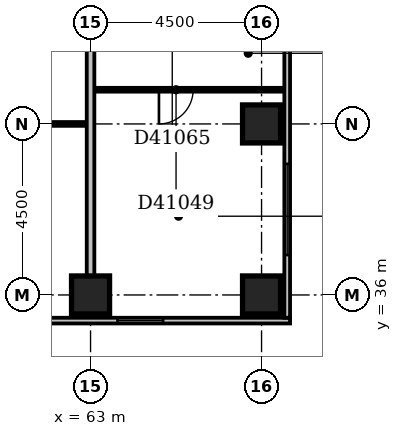
"""IFC4 building model, lengths in metres.
Left out: names, types, materials, properties, quantities, classifications, styles, units other than length and angle.
Written with IfcOpenShell. Run it as: python <this file> out.ifc"""

import sys

from ifc_helpers import new_model, si_unit, direction, frame, frame_2d, origin, origin_2d, place, context, subcontext, project, spatial, rectangle, extrude, element, fill, save


model = new_model("IFC4")
c1 = context("Model", 3, precision=1e-05, world=origin(), true_north=direction((0.0, 1.0)))
c2 = subcontext(c1, "Body", "Model", "MODEL_VIEW")
j1 = project(units=[si_unit("LENGTHUNIT", "METRE"), si_unit("PLANEANGLEUNIT", "RADIAN")], contexts=[c1])
p1 = place(None, origin())
s1 = spatial("IfcSite", under=j1, at=p1, CompositionType="ELEMENT")
p2 = place(p1, origin())
s2 = spatial("IfcBuilding", under=s1, at=p2, CompositionType="ELEMENT")
p3 = place(p2, frame((0.0, 0.0, 162.8)))
s3 = spatial("IfcBuildingStorey", under=s2, at=p3, CompositionType="ELEMENT", Elevation=162.8)
for number, where, z_axis, x_axis in (
    (1, (63.0, 36.0, -0.3), (0.0, 0.0, 1.0), (1.0, 0.0, 0.0)),
    (2, (67.5, 36.0, -0.3), (0.0, 0.0, 1.0), (1.0, 0.0, 0.0)),
    (3, (67.5, 40.5, -0.3), (0.0, 0.0, 1.0), (1.0, 0.0, 0.0)),
):
    element("IfcColumn", number, at=place(p3, frame(where, z_axis=z_axis, x_axis=x_axis)), inside=s3, PredefinedType="COLUMN", context=c2, shape_type="SweptSolid", body=[
        extrude(rectangle(XDim=1.0, YDim=1.0, at=origin_2d()), origin(), (0.0, 0.0, 1.0), 3.6),
    ])
p4 = place(p3, frame((23.1, 35.325, 0.0), z_axis=(0.0, 0.0, 1.0), x_axis=(1.0, 0.0, 0.0)))
e4 = element("IfcWall", 4, at=p4, inside=s3, PredefinedType="STANDARD", context=c2, shape_type="SweptSolid", body=[
    extrude(rectangle(XDim=45.15, YDim=0.15, at=frame_2d((22.575, 0.0))), origin(), (0.0, 0.0, 1.0), 2.7),
])
p5 = place(p4, frame((0.45, 0.0, 0.6)))
e5 = element("IfcOpeningElement", 5, at=p5, cuts=e4, PredefinedType="OPENING", context=c2, shape_type="SweptSolid", body=[
    extrude(rectangle(XDim=2.4, YDim=1.8, at=frame_2d((1.2, 0.9))), frame((0.0, 0.087, 0.0), z_axis=(0.0, -1.0, 0.0), x_axis=(1.0, 0.0, 0.0)), (0.0, 0.0, 1.0), 0.174),
])
p6 = place(p4, frame((4.95, 0.0, 0.6)))
e6 = element("IfcOpeningElement", 6, at=p6, cuts=e4, PredefinedType="OPENING", context=c2, shape_type="SweptSolid", body=[
    extrude(rectangle(XDim=2.4, YDim=1.8, at=frame_2d((1.2, 0.9))), frame((0.0, 0.087, 0.0), z_axis=(0.0, -1.0, 0.0), x_axis=(1.0, 0.0, 0.0)), (0.0, 0.0, 1.0), 0.174),
])
p7 = place(p4, frame((9.167, 0.0, 0.6)))
e7 = element("IfcOpeningElement", 7, at=p7, cuts=e4, PredefinedType="OPENING", context=c2, shape_type="SweptSolid", body=[
    extrude(rectangle(XDim=1.8, YDim=1.8, at=frame_2d((0.9, 0.9))), frame((0.0, 0.087, 0.0), z_axis=(0.0, -1.0, 0.0), x_axis=(1.0, 0.0, 0.0)), (0.0, 0.0, 1.0), 0.174),
])
p8 = place(p4, frame((14.895, 0.0, 0.6)))
e8 = element("IfcOpeningElement", 8, at=p8, cuts=e4, PredefinedType="OPENING", context=c2, shape_type="SweptSolid", body=[
    extrude(rectangle(XDim=1.8, YDim=1.8, at=frame_2d((0.9, 0.9))), frame((0.0, 0.087, 0.0), z_axis=(0.0, -1.0, 0.0), x_axis=(1.0, 0.0, 0.0)), (0.0, 0.0, 1.0), 0.174),
])
p9 = place(p4, frame((18.45, 0.0, 0.6)))
e9 = element("IfcOpeningElement", 9, at=p9, cuts=e4, PredefinedType="OPENING", context=c2, shape_type="SweptSolid", body=[
    extrude(rectangle(XDim=2.4, YDim=1.8, at=frame_2d((1.2, 0.9))), frame((0.0, 0.087, 0.0), z_axis=(0.0, -1.0, 0.0), x_axis=(1.0, 0.0, 0.0)), (0.0, 0.0, 1.0), 0.174),
])
p10 = place(p4, frame((22.95, 0.0, 0.6)))
e10 = element("IfcOpeningElement", 10, at=p10, cuts=e4, PredefinedType="OPENING", context=c2, shape_type="SweptSolid", body=[
    extrude(rectangle(XDim=2.4, YDim=1.8, at=frame_2d((1.2, 0.9))), frame((0.0, 0.087, 0.0), z_axis=(0.0, -1.0, 0.0), x_axis=(1.0, 0.0, 0.0)), (0.0, 0.0, 1.0), 0.174),
])
p11 = place(p4, frame((27.45, 0.0, 0.6)))
e11 = element("IfcOpeningElement", 11, at=p11, cuts=e4, PredefinedType="OPENING", context=c2, shape_type="SweptSolid", body=[
    extrude(rectangle(XDim=2.4, YDim=1.8, at=frame_2d((1.2, 0.9))), frame((0.0, 0.087, 0.0), z_axis=(0.0, -1.0, 0.0), x_axis=(1.0, 0.0, 0.0)), (0.0, 0.0, 1.0), 0.174),
])
p12 = place(p4, frame((31.95, 0.0, 0.6)))
e12 = element("IfcOpeningElement", 12, at=p12, cuts=e4, PredefinedType="OPENING", context=c2, shape_type="SweptSolid", body=[
    extrude(rectangle(XDim=2.4, YDim=1.8, at=frame_2d((1.2, 0.9))), frame((0.0, 0.087, 0.0), z_axis=(0.0, -1.0, 0.0), x_axis=(1.0, 0.0, 0.0)), (0.0, 0.0, 1.0), 0.174),
])
p13 = place(p4, frame((36.45, 0.0, 0.6)))
e13 = element("IfcOpeningElement", 13, at=p13, cuts=e4, PredefinedType="OPENING", context=c2, shape_type="SweptSolid", body=[
    extrude(rectangle(XDim=2.4, YDim=1.8, at=frame_2d((1.2, 0.9))), frame((0.0, 0.087, 0.0), z_axis=(0.0, -1.0, 0.0), x_axis=(1.0, 0.0, 0.0)), (0.0, 0.0, 1.0), 0.174),
])
p14 = place(p4, frame((40.61, 0.0, 0.6)))
e14 = element("IfcOpeningElement", 14, at=p14, cuts=e4, PredefinedType="OPENING", context=c2, shape_type="SweptSolid", body=[
    extrude(rectangle(XDim=1.2, YDim=1.8, at=frame_2d((0.6, 0.9))), frame((0.0, 0.087, 0.0), z_axis=(0.0, -1.0, 0.0), x_axis=(1.0, 0.0, 0.0)), (0.0, 0.0, 1.0), 0.174),
])
p15 = place(p3, frame((68.175, 35.4, 0.0), z_axis=(0.0, 0.0, 1.0), x_axis=(0.0, 1.0, 0.0)))
e15 = element("IfcWall", 15, at=p15, inside=s3, PredefinedType="STANDARD", context=c2, shape_type="SweptSolid", body=[
    extrude(rectangle(XDim=23.85, YDim=0.15, at=frame_2d((11.925, 0.0))), origin(), (0.0, 0.0, 1.0), 2.7),
])
p16 = place(p15, frame((1.65, 0.0, 0.6)))
e16 = element("IfcOpeningElement", 16, at=p16, cuts=e15, PredefinedType="OPENING", context=c2, shape_type="SweptSolid", body=[
    extrude(rectangle(XDim=2.4, YDim=1.8, at=frame_2d((1.2, 0.9))), frame((0.0, 0.087, 0.0), z_axis=(0.0, -1.0, 0.0), x_axis=(1.0, 0.0, 0.0)), (0.0, 0.0, 1.0), 0.174),
])
p17 = place(p15, frame((19.65, 0.0, 0.6)))
e17 = element("IfcOpeningElement", 17, at=p17, cuts=e15, PredefinedType="OPENING", context=c2, shape_type="SweptSolid", body=[
    extrude(rectangle(XDim=2.4, YDim=1.8, at=frame_2d((1.2, 0.9))), frame((0.0, 0.087, 0.0), z_axis=(0.0, -1.0, 0.0), x_axis=(1.0, 0.0, 0.0)), (0.0, 0.0, 1.0), 0.174),
])
p18 = place(p3, frame((63.0, 36.5, 0.0), z_axis=(0.0, 0.0, 1.0), x_axis=(0.0, 1.0, 0.0)))
e18 = element("IfcWall", 18, at=p18, inside=s3, PredefinedType="PARTITIONING", context=c2, shape_type="SweptSolid", body=[
    extrude(rectangle(XDim=12.9, YDim=0.2, at=frame_2d((6.45, 0.0))), origin(), (0.0, 0.0, 1.0), 2.4),
])
p19 = place(p3, frame((58.6, 40.5, 0.0), z_axis=(0.0, 0.0, 1.0), x_axis=(1.0, 0.0, 0.0)))
e19 = element("IfcWall", 19, at=p19, inside=s3, PredefinedType="PARTITIONING", context=c2, shape_type="SweptSolid", body=[
    extrude(rectangle(XDim=4.3, YDim=0.1, at=frame_2d((2.15, 0.0))), origin(), (0.0, 0.0, 1.0), 3.3),
])
p20 = place(p19, frame((1.7, 0.0, 0.0)))
e20 = element("IfcOpeningElement", 20, at=p20, cuts=e19, PredefinedType="OPENING", context=c2, shape_type="SweptSolid", body=[
    extrude(rectangle(XDim=0.9, YDim=2.1, at=frame_2d((0.45, 1.05))), frame((0.0, 0.062, 0.0), z_axis=(0.0, -1.0, 0.0), x_axis=(1.0, 0.0, 0.0)), (0.0, 0.0, 1.0), 0.124),
])
p21 = place(p3, frame((63.1, 41.4, 0.0), z_axis=(0.0, 0.0, 1.0), x_axis=(1.0, 0.0, 0.0)))
e21 = element("IfcWall", 21, at=p21, inside=s3, PredefinedType="PARTITIONING", context=c2, shape_type="SweptSolid", body=[
    extrude(rectangle(XDim=5.0, YDim=0.1, at=frame_2d((2.5, 0.0))), origin(), (0.0, 0.0, 1.0), 3.3),
])
p22 = place(p21, frame((1.7, 0.0, 0.0)))
e22 = element("IfcOpeningElement", 22, at=p22, cuts=e21, PredefinedType="OPENING", context=c2, shape_type="SweptSolid", body=[
    extrude(rectangle(XDim=0.9, YDim=2.1, at=frame_2d((0.45, 1.05))), frame((0.0, 0.062, 0.0), z_axis=(0.0, -1.0, 0.0), x_axis=(1.0, 0.0, 0.0)), (0.0, 0.0, 1.0), 0.124),
])
p23 = place(p14, origin())
e23 = element("IfcWindow", 23, at=p23, inside=s3, PartitioningType="SINGLE_PANEL", PredefinedType="WINDOW", context=c2, shape_type="SweptSolid", body=[
    extrude(rectangle(XDim=1.2, YDim=1.8, at=frame_2d((0.6, 0.9))), frame((0.0, 0.03, 0.0), z_axis=(0.0, -1.0, 0.0), x_axis=(1.0, 0.0, 0.0)), (0.0, 0.0, 1.0), 0.06),
])
fill(e14, e23)
p24 = place(p16, origin())
e24 = element("IfcWindow", 24, at=p24, inside=s3, PartitioningType="SINGLE_PANEL", PredefinedType="WINDOW", context=c2, shape_type="SweptSolid", body=[
    extrude(rectangle(XDim=2.4, YDim=1.8, at=frame_2d((1.2, 0.9))), frame((0.0, 0.03, 0.0), z_axis=(0.0, -1.0, 0.0), x_axis=(1.0, 0.0, 0.0)), (0.0, 0.0, 1.0), 0.06),
])
fill(e16, e24)
p25 = place(p22, frame((0.9, 0.0, 0.0), z_axis=(0.0, 0.0, 1.0), x_axis=(-1.0, 0.0, 0.0)))
e25 = element("IfcDoor", 25, at=p25, inside=s3, OperationType="SINGLE_SWING_RIGHT", PredefinedType="DOOR", context=c2, shape_type="SweptSolid", body=[
    extrude(rectangle(XDim=0.9, YDim=2.1, at=frame_2d((0.45, 1.05))), frame((0.0, 0.025, 0.0), z_axis=(0.0, -1.0, 0.0), x_axis=(1.0, 0.0, 0.0)), (0.0, 0.0, 1.0), 0.05),
])
fill(e22, e25)
save(model, sys.argv[1])
